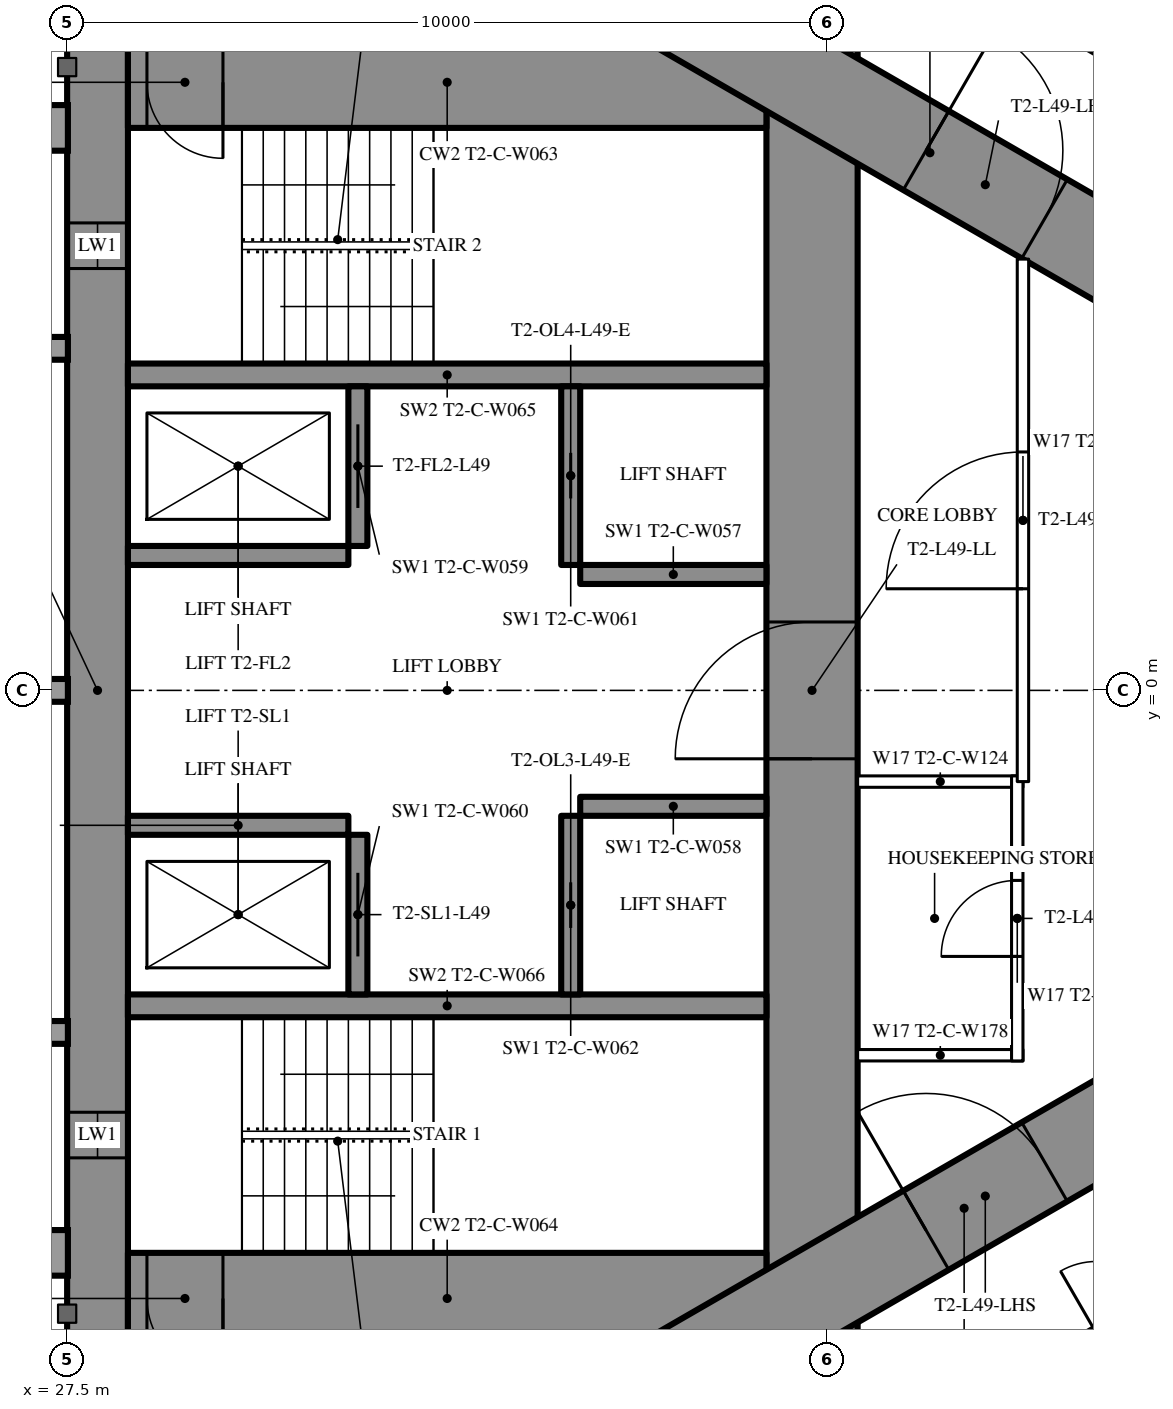
"""IFC4 building model, lengths in metres.
Left out: names, types, materials, properties, quantities, classifications, styles, units other than length and angle.
Written with IfcOpenShell. Run it as: python <this file> out.ifc"""

import sys

from ifc_helpers import new_model, si_unit, direction, frame, frame_2d, origin, place, context, subcontext, project, spatial, rectangle, extrude, element, fill, save


model = new_model("IFC4")
c1 = context("Model", 3, precision=1e-05, world=origin(), true_north=direction((0.0, 1.0)))
c2 = subcontext(c1, "Body", "Model", "MODEL_VIEW")
j1 = project(units=[si_unit("LENGTHUNIT", "METRE"), si_unit("PLANEANGLEUNIT", "RADIAN")], contexts=[c1])
p1 = place(None, origin())
s1 = spatial("IfcSite", under=j1, at=p1, CompositionType="ELEMENT")
p2 = place(p1, origin())
s2 = spatial("IfcBuilding", under=s1, at=p2, CompositionType="ELEMENT")
p3 = place(p2, frame((0.0, 0.0, 184.3)))
s3 = spatial("IfcBuildingStorey", under=s2, at=p3, CompositionType="ELEMENT", Elevation=184.3)
p4 = place(p3, frame((27.9, -8.6, 0.0), z_axis=(0.0, 0.0, 1.0), x_axis=(0.0, 1.0, 0.0)))
e1 = element("IfcWall", 1, at=p4, inside=s3, PredefinedType="SHEAR", context=c2, shape_type="SweptSolid", body=[
    extrude(rectangle(XDim=17.2, YDim=0.8, at=frame_2d((8.6, 0.0))), origin(), (0.0, 0.0, 1.0), 3.5),
])
p5 = place(p4, frame((2.45, 0.0, 0.6)))
e2 = element("IfcOpeningElement", 2, at=p5, cuts=e1, PredefinedType="OPENING", context=c2, shape_type="SweptSolid", body=[
    extrude(rectangle(XDim=0.6, YDim=2.1, at=frame_2d((0.3, 1.05))), frame((0.0, 0.41, 0.0), z_axis=(0.0, -1.0, 0.0), x_axis=(1.0, 0.0, 0.0)), (0.0, 0.0, 1.0), 0.82),
])
p6 = place(p4, frame((14.15, 0.0, 0.6)))
e3 = element("IfcOpeningElement", 3, at=p6, cuts=e1, PredefinedType="OPENING", context=c2, shape_type="SweptSolid", body=[
    extrude(rectangle(XDim=0.6, YDim=2.1, at=frame_2d((0.3, 1.05))), frame((0.0, 0.41, 0.0), z_axis=(0.0, -1.0, 0.0), x_axis=(1.0, 0.0, 0.0)), (0.0, 0.0, 1.0), 0.82),
])
p7 = place(p3, frame((37.3, -8.6, 0.0), z_axis=(0.0, 0.0, 1.0), x_axis=(0.0, 1.0, 0.0)))
e4 = element("IfcWall", 4, at=p7, inside=s3, PredefinedType="SHEAR", context=c2, shape_type="SweptSolid", body=[
    extrude(rectangle(XDim=17.2, YDim=1.2, at=frame_2d((8.6, 0.0))), origin(), (0.0, 0.0, 1.0), 3.5),
])
p8 = place(p7, frame((7.7, 0.0, 0.0)))
e5 = element("IfcOpeningElement", 5, at=p8, cuts=e4, PredefinedType="OPENING", context=c2, shape_type="SweptSolid", body=[
    extrude(rectangle(XDim=1.8, YDim=2.2, at=frame_2d((0.9, 1.1))), frame((0.0, 0.61, 0.0), z_axis=(0.0, -1.0, 0.0), x_axis=(1.0, 0.0, 0.0)), (0.0, 0.0, 1.0), 1.22),
])
p9 = place(p3, frame((28.3, -8.0, 0.0), z_axis=(0.0, 0.0, 1.0), x_axis=(1.0, 0.0, 0.0)))
e6 = element("IfcWall", 6, at=p9, inside=s3, PredefinedType="SHEAR", context=c2, shape_type="SweptSolid", body=[
    extrude(rectangle(XDim=8.4, YDim=1.2, at=frame_2d((4.2, 0.0))), origin(), (0.0, 0.0, 1.0), 3.5),
])
p10 = place(p9, frame((0.25, 0.0, 0.0)))
e7 = element("IfcOpeningElement", 7, at=p10, cuts=e6, PredefinedType="OPENING", context=c2, shape_type="SweptSolid", body=[
    extrude(rectangle(XDim=1.0, YDim=2.2, at=frame_2d((0.5, 1.1))), frame((0.0, 0.61, 0.0), z_axis=(0.0, -1.0, 0.0), x_axis=(1.0, 0.0, 0.0)), (0.0, 0.0, 1.0), 1.22),
])
p11 = place(p3, frame((28.3, 8.0, 0.0), z_axis=(0.0, 0.0, 1.0), x_axis=(1.0, 0.0, 0.0)))
e8 = element("IfcWall", 8, at=p11, inside=s3, PredefinedType="SHEAR", context=c2, shape_type="SweptSolid", body=[
    extrude(rectangle(XDim=8.4, YDim=1.2, at=frame_2d((4.2, 0.0))), origin(), (0.0, 0.0, 1.0), 3.5),
])
p12 = place(p11, frame((0.25, 0.0, 0.0)))
e9 = element("IfcOpeningElement", 9, at=p12, cuts=e8, PredefinedType="OPENING", context=c2, shape_type="SweptSolid", body=[
    extrude(rectangle(XDim=1.0, YDim=2.2, at=frame_2d((0.5, 1.1))), frame((0.0, 0.61, 0.0), z_axis=(0.0, -1.0, 0.0), x_axis=(1.0, 0.0, 0.0)), (0.0, 0.0, 1.0), 1.22),
])
for number, where, z_axis, x_axis in (
    (10, (28.3, -4.15, 0.0), (0.0, 0.0, 1.0), (1.0, 0.0, 0.0)),
    (11, (28.3, 4.15, 0.0), (0.0, 0.0, 1.0), (1.0, 0.0, 0.0)),
):
    element("IfcWall", number, at=place(p3, frame(where, z_axis=z_axis, x_axis=x_axis)), inside=s3, PredefinedType="SHEAR", context=c2, shape_type="SweptSolid", body=[
        extrude(rectangle(XDim=8.4, YDim=0.3, at=frame_2d((4.2, 0.0))), origin(), (0.0, 0.0, 1.0), 3.5),
    ])
p13 = place(p3, frame((31.325, -4.0, 0.0), z_axis=(0.0, 0.0, 1.0), x_axis=(0.0, 1.0, 0.0)))
e12 = element("IfcWall", 12, at=p13, inside=s3, PredefinedType="SHEAR", context=c2, shape_type="SweptSolid", body=[
    extrude(rectangle(XDim=2.1, YDim=0.25, at=frame_2d((1.05, 0.0))), origin(), (0.0, 0.0, 1.0), 3.5),
])
p14 = place(p13, frame((0.5, 0.0, 0.0)))
e13 = element("IfcOpeningElement", 13, at=p14, cuts=e12, PredefinedType="OPENING", context=c2, shape_type="SweptSolid", body=[
    extrude(rectangle(XDim=1.1, YDim=2.2, at=frame_2d((0.55, 1.1))), frame((0.0, 0.135, 0.0), z_axis=(0.0, -1.0, 0.0), x_axis=(1.0, 0.0, 0.0)), (0.0, 0.0, 1.0), 0.27),
])
p15 = place(p3, frame((34.125, -4.0, 0.0), z_axis=(0.0, 0.0, 1.0), x_axis=(0.0, 1.0, 0.0)))
e14 = element("IfcWall", 14, at=p15, inside=s3, PredefinedType="SHEAR", context=c2, shape_type="SweptSolid", body=[
    extrude(rectangle(XDim=2.35, YDim=0.25, at=frame_2d((1.175, 0.0))), origin(), (0.0, 0.0, 1.0), 3.5),
])
p16 = place(p15, frame((0.875, 0.0, 0.0)))
e15 = element("IfcOpeningElement", 15, at=p16, cuts=e14, PredefinedType="OPENING", context=c2, shape_type="SweptSolid", body=[
    extrude(rectangle(XDim=0.6, YDim=2.0, at=frame_2d((0.3, 1.0))), frame((0.0, 0.135, 0.0), z_axis=(0.0, -1.0, 0.0), x_axis=(1.0, 0.0, 0.0)), (0.0, 0.0, 1.0), 0.27),
])
p17 = place(p3, frame((28.3, -1.775, 0.0), z_axis=(0.0, 0.0, 1.0), x_axis=(1.0, 0.0, 0.0)))
e16 = element("IfcWall", 16, at=p17, inside=s3, PredefinedType="SHEAR", context=c2, shape_type="SweptSolid", body=[
    extrude(rectangle(XDim=2.9, YDim=0.25, at=frame_2d((1.45, 0.0))), origin(), (0.0, 0.0, 1.0), 3.5),
])
p18 = place(p3, frame((34.25, -1.525, 0.0), z_axis=(0.0, 0.0, 1.0), x_axis=(1.0, 0.0, 0.0)))
e17 = element("IfcWall", 17, at=p18, inside=s3, PredefinedType="SHEAR", context=c2, shape_type="SweptSolid", body=[
    extrude(rectangle(XDim=2.45, YDim=0.25, at=frame_2d((1.225, 0.0))), origin(), (0.0, 0.0, 1.0), 3.5),
])
p19 = place(p3, frame((31.325, 1.9, 0.0), z_axis=(0.0, 0.0, 1.0), x_axis=(0.0, 1.0, 0.0)))
e18 = element("IfcWall", 18, at=p19, inside=s3, PredefinedType="SHEAR", context=c2, shape_type="SweptSolid", body=[
    extrude(rectangle(XDim=2.1, YDim=0.25, at=frame_2d((1.05, 0.0))), origin(), (0.0, 0.0, 1.0), 3.5),
])
p20 = place(p19, frame((0.5, 0.0, 0.0)))
e19 = element("IfcOpeningElement", 19, at=p20, cuts=e18, PredefinedType="OPENING", context=c2, shape_type="SweptSolid", body=[
    extrude(rectangle(XDim=1.1, YDim=2.2, at=frame_2d((0.55, 1.1))), frame((0.0, 0.135, 0.0), z_axis=(0.0, -1.0, 0.0), x_axis=(1.0, 0.0, 0.0)), (0.0, 0.0, 1.0), 0.27),
])
p21 = place(p3, frame((34.125, 1.65, 0.0), z_axis=(0.0, 0.0, 1.0), x_axis=(0.0, 1.0, 0.0)))
e20 = element("IfcWall", 20, at=p21, inside=s3, PredefinedType="SHEAR", context=c2, shape_type="SweptSolid", body=[
    extrude(rectangle(XDim=2.35, YDim=0.25, at=frame_2d((1.175, 0.0))), origin(), (0.0, 0.0, 1.0), 3.5),
])
p22 = place(p21, frame((0.875, 0.0, 0.0)))
e21 = element("IfcOpeningElement", 21, at=p22, cuts=e20, PredefinedType="OPENING", context=c2, shape_type="SweptSolid", body=[
    extrude(rectangle(XDim=0.6, YDim=2.0, at=frame_2d((0.3, 1.0))), frame((0.0, 0.135, 0.0), z_axis=(0.0, -1.0, 0.0), x_axis=(1.0, 0.0, 0.0)), (0.0, 0.0, 1.0), 0.27),
])
p23 = place(p3, frame((28.3, 1.775, 0.0), z_axis=(0.0, 0.0, 1.0), x_axis=(1.0, 0.0, 0.0)))
e22 = element("IfcWall", 22, at=p23, inside=s3, PredefinedType="SHEAR", context=c2, shape_type="SweptSolid", body=[
    extrude(rectangle(XDim=2.9, YDim=0.25, at=frame_2d((1.45, 0.0))), origin(), (0.0, 0.0, 1.0), 3.5),
])
p24 = place(p3, frame((34.25, 1.525, 0.0), z_axis=(0.0, 0.0, 1.0), x_axis=(1.0, 0.0, 0.0)))
e23 = element("IfcWall", 23, at=p24, inside=s3, PredefinedType="SHEAR", context=c2, shape_type="SweptSolid", body=[
    extrude(rectangle(XDim=2.45, YDim=0.25, at=frame_2d((1.225, 0.0))), origin(), (0.0, 0.0, 1.0), 3.5),
])
p25 = place(p3, frame((27.2, -13.8, 0.0), z_axis=(0.0, 0.0, 1.0), x_axis=(0.866027159892, 0.499996958321, 0.0)))
e24 = element("IfcWall", 24, at=p25, inside=s3, PredefinedType="SHEAR", context=c2, shape_type="SweptSolid", body=[
    extrude(rectangle(XDim=27.947, YDim=1.2, at=frame_2d((13.973, 0.0))), origin(), (0.0, 0.0, 1.0), 3.5),
])
p26 = place(p25, frame((4.6, 0.0, 0.0)))
e25 = element("IfcOpeningElement", 25, at=p26, cuts=e24, PredefinedType="OPENING", context=c2, shape_type="SweptSolid", body=[
    extrude(rectangle(XDim=1.0, YDim=2.2, at=frame_2d((0.5, 1.1))), frame((0.0, 0.61, 0.0), z_axis=(0.0, -1.0, 0.0), x_axis=(1.0, 0.0, 0.0)), (0.0, 0.0, 1.0), 1.22),
])
p27 = place(p25, frame((13.395, 0.0, 0.0)))
e26 = element("IfcOpeningElement", 26, at=p27, cuts=e24, PredefinedType="OPENING", context=c2, shape_type="SweptSolid", body=[
    extrude(rectangle(XDim=1.8, YDim=2.2, at=frame_2d((0.9, 1.1))), frame((0.0, 0.61, 0.0), z_axis=(0.0, -1.0, 0.0), x_axis=(1.0, 0.0, 0.0)), (0.0, 0.0, 1.0), 1.22),
])
p28 = place(p3, frame((27.2, 13.8, 0.0), z_axis=(0.0, 0.0, 1.0), x_axis=(0.866024515034, -0.500001539357, 0.0)))
e27 = element("IfcWall", 27, at=p28, inside=s3, PredefinedType="SHEAR", context=c2, shape_type="SweptSolid", body=[
    extrude(rectangle(XDim=26.907, YDim=1.2, at=frame_2d((13.454, 0.0))), origin(), (0.0, 0.0, 1.0), 3.5),
])
p29 = place(p28, frame((4.6, 0.0, 0.0)))
e28 = element("IfcOpeningElement", 28, at=p29, cuts=e27, PredefinedType="OPENING", context=c2, shape_type="SweptSolid", body=[
    extrude(rectangle(XDim=1.0, YDim=2.2, at=frame_2d((0.5, 1.1))), frame((0.0, 0.61, 0.0), z_axis=(0.0, -1.0, 0.0), x_axis=(1.0, 0.0, 0.0)), (0.0, 0.0, 1.0), 1.22),
])
p30 = place(p28, frame((13.395, 0.0, 0.0)))
e29 = element("IfcOpeningElement", 29, at=p30, cuts=e27, PredefinedType="OPENING", context=c2, shape_type="SweptSolid", body=[
    extrude(rectangle(XDim=1.8, YDim=2.2, at=frame_2d((0.9, 1.1))), frame((0.0, 0.61, 0.0), z_axis=(0.0, -1.0, 0.0), x_axis=(1.0, 0.0, 0.0)), (0.0, 0.0, 1.0), 1.22),
])
p31 = place(p3, frame((27.959, 16.017, 0.0), z_axis=(0.0, 0.0, 1.0), x_axis=(0.866027146794, -0.499996981007, 0.0)))
e30 = element("IfcWall", 30, at=p31, inside=s3, PredefinedType="PARTITIONING", context=c2, shape_type="SweptSolid", body=[
    extrude(rectangle(XDim=21.657, YDim=0.2, at=frame_2d((10.829, 0.0))), origin(), (0.0, 0.0, 1.0), 3.25),
])
p32 = place(p31, frame((17.741, 0.0, 0.0)))
e31 = element("IfcOpeningElement", 31, at=p32, cuts=e30, PredefinedType="OPENING", context=c2, shape_type="SweptSolid", body=[
    extrude(rectangle(XDim=0.95, YDim=2.2, at=frame_2d((0.475, 1.1))), frame((0.0, 0.11, 0.0), z_axis=(0.0, -1.0, 0.0), x_axis=(1.0, 0.0, 0.0)), (0.0, 0.0, 1.0), 0.22),
])
p33 = place(p31, frame((10.782, 0.0, 0.0)))
e32 = element("IfcOpeningElement", 32, at=p33, cuts=e30, PredefinedType="OPENING", context=c2, shape_type="SweptSolid", body=[
    extrude(rectangle(XDim=0.95, YDim=2.2, at=frame_2d((0.475, 1.1))), frame((0.0, 0.11, 0.0), z_axis=(0.0, -1.0, 0.0), x_axis=(1.0, 0.0, 0.0)), (0.0, 0.0, 1.0), 0.22),
])
p34 = place(p31, frame((6.732, 0.0, 0.0)))
e33 = element("IfcOpeningElement", 33, at=p34, cuts=e30, PredefinedType="OPENING", context=c2, shape_type="SweptSolid", body=[
    extrude(rectangle(XDim=0.95, YDim=2.2, at=frame_2d((0.475, 1.1))), frame((0.0, 0.11, 0.0), z_axis=(0.0, -1.0, 0.0), x_axis=(1.0, 0.0, 0.0)), (0.0, 0.0, 1.0), 0.22),
])
p35 = place(p31, frame((19.349, 0.0, 0.0)))
e34 = element("IfcOpeningElement", 34, at=p35, cuts=e30, PredefinedType="OPENING", context=c2, shape_type="SweptSolid", body=[
    extrude(rectangle(XDim=1.8, YDim=2.2, at=frame_2d((0.9, 1.1))), frame((0.0, 0.11, 0.0), z_axis=(0.0, -1.0, 0.0), x_axis=(1.0, 0.0, 0.0)), (0.0, 0.0, 1.0), 0.22),
])
p36 = place(p3, frame((27.959, -16.017, 0.0), z_axis=(0.0, 0.0, 1.0), x_axis=(0.866024180982, 0.50000211795, 0.0)))
e35 = element("IfcWall", 35, at=p36, inside=s3, PredefinedType="PARTITIONING", context=c2, shape_type="SweptSolid", body=[
    extrude(rectangle(XDim=23.375, YDim=0.2, at=frame_2d((11.688, 0.0))), origin(), (0.0, 0.0, 1.0), 3.25),
])
p37 = place(p36, frame((2.415, 0.0, 0.0)))
e36 = element("IfcOpeningElement", 36, at=p37, cuts=e35, PredefinedType="OPENING", context=c2, shape_type="SweptSolid", body=[
    extrude(rectangle(XDim=0.95, YDim=2.2, at=frame_2d((0.475, 1.1))), frame((0.0, 0.11, 0.0), z_axis=(0.0, -1.0, 0.0), x_axis=(1.0, 0.0, 0.0)), (0.0, 0.0, 1.0), 0.22),
])
p38 = place(p36, frame((9.215, 0.0, 0.0)))
e37 = element("IfcOpeningElement", 37, at=p38, cuts=e35, PredefinedType="OPENING", context=c2, shape_type="SweptSolid", body=[
    extrude(rectangle(XDim=1.0, YDim=2.2, at=frame_2d((0.5, 1.1))), frame((0.0, 0.11, 0.0), z_axis=(0.0, -1.0, 0.0), x_axis=(1.0, 0.0, 0.0)), (0.0, 0.0, 1.0), 0.22),
])
p39 = place(p36, frame((15.109, 0.0, 0.0)))
e38 = element("IfcOpeningElement", 38, at=p39, cuts=e35, PredefinedType="OPENING", context=c2, shape_type="SweptSolid", body=[
    extrude(rectangle(XDim=0.95, YDim=2.2, at=frame_2d((0.475, 1.1))), frame((0.0, 0.11, 0.0), z_axis=(0.0, -1.0, 0.0), x_axis=(1.0, 0.0, 0.0)), (0.0, 0.0, 1.0), 0.22),
])
for number, where, z_axis, x_axis in (
    (39, (37.9, -1.2, 0.0), (0.0, 0.0, 1.0), (1.0, 0.0, 0.0)),
    (40, (37.9, -4.8, 0.0), (0.0, 0.0, 1.0), (1.0, 0.0, 0.0)),
):
    element("IfcWall", number, at=place(p3, frame(where, z_axis=z_axis, x_axis=x_axis)), inside=s3, PredefinedType="PARTITIONING", context=c2, shape_type="SweptSolid", body=[
        extrude(rectangle(XDim=2.175, YDim=0.15, at=frame_2d((1.087, 0.0))), origin(), (0.0, 0.0, 1.0), 3.25),
    ])
p40 = place(p3, frame((40.0, -4.875, 0.0), z_axis=(0.0, 0.0, 1.0), x_axis=(0.0, 1.0, 0.0)))
e41 = element("IfcWall", 41, at=p40, inside=s3, PredefinedType="PARTITIONING", context=c2, shape_type="SweptSolid", body=[
    extrude(rectangle(XDim=3.75, YDim=0.15, at=frame_2d((1.875, 0.0))), origin(), (0.0, 0.0, 1.0), 3.25),
])
p41 = place(p40, frame((1.375, 0.0, 0.0)))
e42 = element("IfcOpeningElement", 42, at=p41, cuts=e41, PredefinedType="OPENING", context=c2, shape_type="SweptSolid", body=[
    extrude(rectangle(XDim=1.0, YDim=2.2, at=frame_2d((0.5, 1.1))), frame((0.0, 0.085, 0.0), z_axis=(0.0, -1.0, 0.0), x_axis=(1.0, 0.0, 0.0)), (0.0, 0.0, 1.0), 0.17),
])
p42 = place(p3, frame((40.075, -1.2, 0.0), z_axis=(0.0, 0.0, 1.0), x_axis=(0.0, 1.0, 0.0)))
e43 = element("IfcWall", 43, at=p42, inside=s3, PredefinedType="PARTITIONING", context=c2, shape_type="SweptSolid", body=[
    extrude(rectangle(XDim=6.874, YDim=0.15, at=frame_2d((3.437, 0.0))), origin(), (0.0, 0.0, 1.0), 3.25),
])
p43 = place(p42, frame((2.537, 0.0, 0.0)))
e44 = element("IfcOpeningElement", 44, at=p43, cuts=e43, PredefinedType="OPENING", context=c2, shape_type="SweptSolid", body=[
    extrude(rectangle(XDim=1.8, YDim=2.2, at=frame_2d((0.9, 1.1))), frame((0.0, 0.085, 0.0), z_axis=(0.0, -1.0, 0.0), x_axis=(1.0, 0.0, 0.0)), (0.0, 0.0, 1.0), 0.17),
])
p44 = place(p41, origin())
e45 = element("IfcDoor", 45, at=p44, inside=s3, OperationType="SINGLE_SWING_LEFT", PredefinedType="DOOR", context=c2, shape_type="SweptSolid", body=[
    extrude(rectangle(XDim=1.0, YDim=2.2, at=frame_2d((0.5, 1.1))), frame((0.0, 0.025, 0.0), z_axis=(0.0, -1.0, 0.0), x_axis=(1.0, 0.0, 0.0)), (0.0, 0.0, 1.0), 0.05),
])
fill(e42, e45)
p45 = place(p43, origin())
e46 = element("IfcDoor", 46, at=p45, inside=s3, OperationType="DOUBLE_DOOR_SINGLE_SWING", PredefinedType="DOOR", context=c2, shape_type="SweptSolid", body=[
    extrude(rectangle(XDim=1.8, YDim=2.2, at=frame_2d((0.9, 1.1))), frame((0.0, 0.025, 0.0), z_axis=(0.0, -1.0, 0.0), x_axis=(1.0, 0.0, 0.0)), (0.0, 0.0, 1.0), 0.05),
])
fill(e44, e46)
p46 = place(p27, origin())
e47 = element("IfcDoor", 47, at=p46, inside=s3, OperationType="DOUBLE_DOOR_SINGLE_SWING", PredefinedType="DOOR", context=c2, shape_type="SweptSolid", body=[
    extrude(rectangle(XDim=1.8, YDim=2.2, at=frame_2d((0.9, 1.1))), frame((0.0, 0.025, 0.0), z_axis=(0.0, -1.0, 0.0), x_axis=(1.0, 0.0, 0.0)), (0.0, 0.0, 1.0), 0.05),
])
fill(e26, e47)
p47 = place(p30, origin())
e48 = element("IfcDoor", 48, at=p47, inside=s3, OperationType="DOUBLE_DOOR_SINGLE_SWING", PredefinedType="DOOR", context=c2, shape_type="SweptSolid", body=[
    extrude(rectangle(XDim=1.8, YDim=2.2, at=frame_2d((0.9, 1.1))), frame((0.0, 0.025, 0.0), z_axis=(0.0, -1.0, 0.0), x_axis=(1.0, 0.0, 0.0)), (0.0, 0.0, 1.0), 0.05),
])
fill(e29, e48)
p48 = place(p8, origin())
e49 = element("IfcDoor", 49, at=p48, inside=s3, OperationType="DOUBLE_DOOR_SINGLE_SWING", PredefinedType="DOOR", context=c2, shape_type="SweptSolid", body=[
    extrude(rectangle(XDim=1.8, YDim=2.2, at=frame_2d((0.9, 1.1))), frame((0.0, 0.025, 0.0), z_axis=(0.0, -1.0, 0.0), x_axis=(1.0, 0.0, 0.0)), (0.0, 0.0, 1.0), 0.05),
])
fill(e5, e49)
p49 = place(p10, origin())
e50 = element("IfcDoor", 50, at=p49, inside=s3, OperationType="SINGLE_SWING_RIGHT", PredefinedType="DOOR", context=c2, shape_type="SweptSolid", body=[
    extrude(rectangle(XDim=1.0, YDim=2.2, at=frame_2d((0.5, 1.1))), frame((0.0, 0.025, 0.0), z_axis=(0.0, -1.0, 0.0), x_axis=(1.0, 0.0, 0.0)), (0.0, 0.0, 1.0), 0.05),
])
fill(e7, e50)
p50 = place(p12, origin())
e51 = element("IfcDoor", 51, at=p50, inside=s3, OperationType="SINGLE_SWING_RIGHT", PredefinedType="DOOR", context=c2, shape_type="SweptSolid", body=[
    extrude(rectangle(XDim=1.0, YDim=2.2, at=frame_2d((0.5, 1.1))), frame((0.0, 0.025, 0.0), z_axis=(0.0, -1.0, 0.0), x_axis=(1.0, 0.0, 0.0)), (0.0, 0.0, 1.0), 0.05),
])
fill(e9, e51)
p51 = place(p14, origin())
e52 = element("IfcDoor", 52, at=p51, inside=s3, OperationType="SLIDING_TO_LEFT", PredefinedType="USERDEFINED", context=c2, shape_type="SweptSolid", body=[
    extrude(rectangle(XDim=1.1, YDim=2.2, at=frame_2d((0.55, 1.1))), frame((0.0, 0.025, 0.0), z_axis=(0.0, -1.0, 0.0), x_axis=(1.0, 0.0, 0.0)), (0.0, 0.0, 1.0), 0.05),
])
fill(e13, e52)
p52 = place(p20, origin())
e53 = element("IfcDoor", 53, at=p52, inside=s3, OperationType="SLIDING_TO_LEFT", PredefinedType="USERDEFINED", context=c2, shape_type="SweptSolid", body=[
    extrude(rectangle(XDim=1.1, YDim=2.2, at=frame_2d((0.55, 1.1))), frame((0.0, 0.025, 0.0), z_axis=(0.0, -1.0, 0.0), x_axis=(1.0, 0.0, 0.0)), (0.0, 0.0, 1.0), 0.05),
])
fill(e19, e53)
p53 = place(p16, origin())
e54 = element("IfcDoor", 54, at=p53, inside=s3, OperationType="SLIDING_TO_LEFT", PredefinedType="DOOR", context=c2, shape_type="SweptSolid", body=[
    extrude(rectangle(XDim=0.6, YDim=2.0, at=frame_2d((0.3, 1.0))), frame((0.0, 0.025, 0.0), z_axis=(0.0, -1.0, 0.0), x_axis=(1.0, 0.0, 0.0)), (0.0, 0.0, 1.0), 0.05),
])
fill(e15, e54)
p54 = place(p22, origin())
e55 = element("IfcDoor", 55, at=p54, inside=s3, OperationType="SLIDING_TO_LEFT", PredefinedType="DOOR", context=c2, shape_type="SweptSolid", body=[
    extrude(rectangle(XDim=0.6, YDim=2.0, at=frame_2d((0.3, 1.0))), frame((0.0, 0.025, 0.0), z_axis=(0.0, -1.0, 0.0), x_axis=(1.0, 0.0, 0.0)), (0.0, 0.0, 1.0), 0.05),
])
fill(e21, e55)
p55 = place(p5, origin())
e56 = element("IfcWindow", 56, at=p55, inside=s3, PartitioningType="SINGLE_PANEL", PredefinedType="WINDOW", context=c2, shape_type="SweptSolid", body=[
    extrude(rectangle(XDim=0.6, YDim=2.1, at=frame_2d((0.3, 1.05))), frame((0.0, 0.03, 0.0), z_axis=(0.0, -1.0, 0.0), x_axis=(1.0, 0.0, 0.0)), (0.0, 0.0, 1.0), 0.06),
])
fill(e2, e56)
p56 = place(p6, origin())
e57 = element("IfcWindow", 57, at=p56, inside=s3, PartitioningType="SINGLE_PANEL", PredefinedType="WINDOW", context=c2, shape_type="SweptSolid", body=[
    extrude(rectangle(XDim=0.6, YDim=2.1, at=frame_2d((0.3, 1.05))), frame((0.0, 0.03, 0.0), z_axis=(0.0, -1.0, 0.0), x_axis=(1.0, 0.0, 0.0)), (0.0, 0.0, 1.0), 0.06),
])
fill(e3, e57)
save(model, sys.argv[1])
